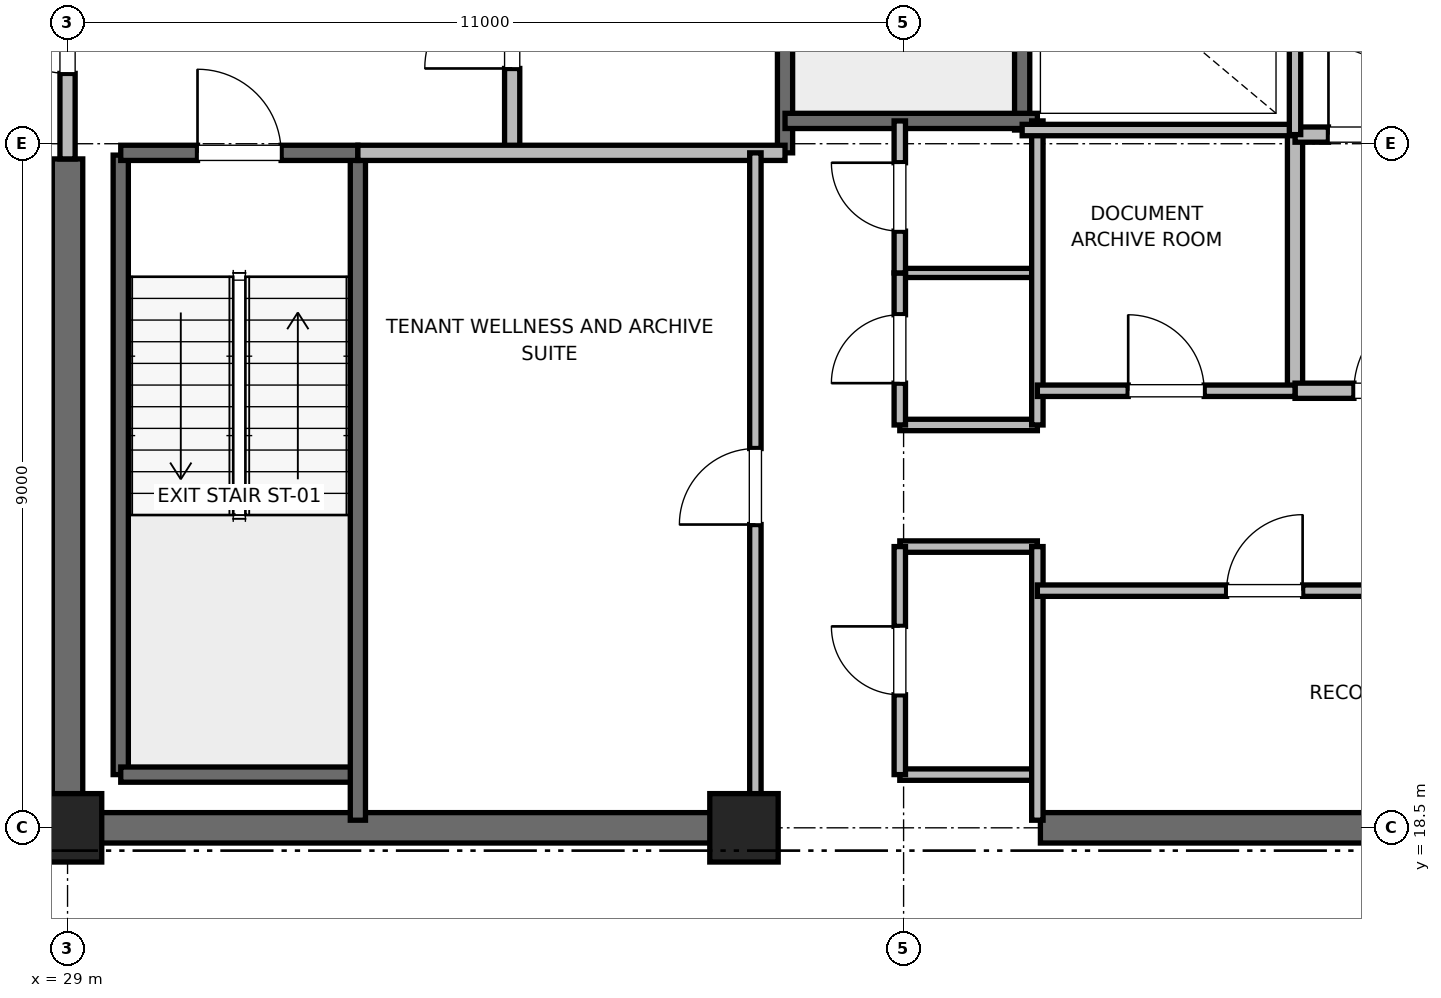
"""IFC4 building model, lengths in metres.
Left out: names, types, materials, properties, quantities, classifications, styles, units other than length and angle.
Written with IfcOpenShell. Run it as: python <this file> out.ifc"""

import sys

from ifc_helpers import new_model, si_unit, direction, frame, frame_2d, origin, origin_2d, place, context, subcontext, project, spatial, rectangle, extrude, element, fill, save


model = new_model("IFC4")
c1 = context("Model", 3, precision=1e-05, world=origin(), true_north=direction((0.0, 1.0)))
c2 = subcontext(c1, "Body", "Model", "MODEL_VIEW")
j1 = project(units=[si_unit("LENGTHUNIT", "METRE"), si_unit("PLANEANGLEUNIT", "RADIAN")], contexts=[c1])
p1 = place(None, origin())
s1 = spatial("IfcSite", under=j1, at=p1, CompositionType="ELEMENT")
p2 = place(p1, origin())
s2 = spatial("IfcBuilding", under=s1, at=p2, CompositionType="ELEMENT")
p3 = place(p2, frame((0.0, 0.0, 310.8)))
s3 = spatial("IfcBuildingStorey", under=s2, at=p3, CompositionType="ELEMENT", Elevation=310.8)
for number, where, z_axis, x_axis in (
    (1, (29.0, 18.5, 0.0), (0.0, 0.0, 1.0), (1.0, 0.0, 0.0)),
    (2, (37.9, 18.5, 0.0), (0.0, 0.0, 1.0), (1.0, 0.0, 0.0)),
):
    element("IfcColumn", number, at=place(p3, frame(where, z_axis=z_axis, x_axis=x_axis)), inside=s3, PredefinedType="PILASTER", context=c2, shape_type="SweptSolid", body=[
        extrude(rectangle(XDim=0.9, YDim=0.9, at=origin_2d()), origin(), (0.0, 0.0, 1.0), 4.0),
    ])
for number, where, z_axis, x_axis in (
    (3, (29.0, 18.5, 0.0), (0.0, 0.0, 1.0), (1.0, 0.0, 0.0)),
    (4, (41.8, 18.5, 0.0), (0.0, 0.0, 1.0), (1.0, 0.0, 0.0)),
):
    element("IfcWall", number, at=place(p3, frame(where, z_axis=z_axis, x_axis=x_axis)), inside=s3, PredefinedType="SHEAR", context=c2, shape_type="SweptSolid", body=[
        extrude(rectangle(XDim=9.2, YDim=0.4, at=frame_2d((4.6, 0.0))), origin(), (0.0, 0.0, 1.0), 3.785),
    ])
p4 = place(p3, frame((29.0, 18.5, 0.0), z_axis=(0.0, 0.0, 1.0), x_axis=(0.0, 1.0, 0.0)))
e5 = element("IfcWall", 5, at=p4, inside=s3, PredefinedType="SHEAR", context=c2, shape_type="SweptSolid", body=[
    extrude(rectangle(XDim=8.8, YDim=0.4, at=frame_2d((4.4, 0.0))), origin(), (0.0, 0.0, 1.0), 3.785),
])
p5 = place(p3, frame((29.7, 19.2, 0.0), z_axis=(0.0, 0.0, 1.0), x_axis=(0.0, 1.0, 0.0)))
e6 = element("IfcWall", 6, at=p5, inside=s3, PredefinedType="SOLIDWALL", context=c2, shape_type="SweptSolid", body=[
    extrude(rectangle(XDim=8.15, YDim=0.2, at=frame_2d((4.075, 0.0))), origin(), (0.0, 0.0, 1.0), 3.785),
])
p6 = place(p3, frame((29.7, 19.2, 0.0), z_axis=(0.0, 0.0, 1.0), x_axis=(1.0, 0.0, 0.0)))
e7 = element("IfcWall", 7, at=p6, inside=s3, PredefinedType="SOLIDWALL", context=c2, shape_type="SweptSolid", body=[
    extrude(rectangle(XDim=3.12, YDim=0.2, at=frame_2d((1.56, 0.0))), origin(), (0.0, 0.0, 1.0), 3.785),
])
p7 = place(p3, frame((32.82, 18.6, 0.0), z_axis=(0.0, 0.0, 1.0), x_axis=(0.0, 1.0, 0.0)))
e8 = element("IfcWall", 8, at=p7, inside=s3, PredefinedType="SOLIDWALL", context=c2, shape_type="SweptSolid", body=[
    extrude(rectangle(XDim=8.78, YDim=0.2, at=frame_2d((4.39, 0.0))), origin(), (0.0, 0.0, 1.0), 3.785),
])
p8 = place(p3, frame((29.7, 27.38, 0.0), z_axis=(0.0, 0.0, 1.0), x_axis=(1.0, 0.0, 0.0)))
e9 = element("IfcWall", 9, at=p8, inside=s3, PredefinedType="SOLIDWALL", context=c2, shape_type="SweptSolid", body=[
    extrude(rectangle(XDim=3.12, YDim=0.2, at=frame_2d((1.56, 0.0))), origin(), (0.0, 0.0, 1.0), 3.785),
])
p9 = place(p8, frame((1.01, 0.0, 0.0)))
e10 = element("IfcOpeningElement", 10, at=p9, cuts=e9, PredefinedType="OPENING", context=c2, shape_type="SweptSolid", body=[
    extrude(rectangle(XDim=1.1, YDim=2.15, at=frame_2d((0.55, 1.075))), frame((0.0, 0.1, 0.0), z_axis=(0.0, -1.0, 0.0), x_axis=(1.0, 0.0, 0.0)), (0.0, 0.0, 1.0), 0.2),
])
p10 = place(p3, frame((38.44, 27.38, 0.0), z_axis=(0.0, 0.0, 1.0), x_axis=(0.0, 1.0, 0.0)))
e11 = element("IfcWall", 11, at=p10, inside=s3, PredefinedType="SOLIDWALL", context=c2, shape_type="SweptSolid", body=[
    extrude(rectangle(XDim=8.87, YDim=0.2, at=frame_2d((4.435, 0.0))), origin(), (0.0, 0.0, 1.0), 3.785),
])
p11 = place(p3, frame((41.56, 27.68, 0.0), z_axis=(0.0, 0.0, 1.0), x_axis=(0.0, 1.0, 0.0)))
e12 = element("IfcWall", 12, at=p11, inside=s3, PredefinedType="SOLIDWALL", context=c2, shape_type="SweptSolid", body=[
    extrude(rectangle(XDim=8.57, YDim=0.2, at=frame_2d((4.285, 0.0))), origin(), (0.0, 0.0, 1.0), 3.785),
])
p12 = place(p3, frame((38.44, 27.8, 0.0), z_axis=(0.0, 0.0, 1.0), x_axis=(1.0, 0.0, 0.0)))
e13 = element("IfcWall", 13, at=p12, inside=s3, PredefinedType="SOLIDWALL", context=c2, shape_type="SweptSolid", body=[
    extrude(rectangle(XDim=3.32, YDim=0.2, at=frame_2d((1.66, 0.0))), origin(), (0.0, 0.0, 1.0), 3.785),
])
p13 = place(p3, frame((34.85, 27.38, 0.0), z_axis=(0.0, 0.0, 1.0), x_axis=(0.0, 1.0, 0.0)))
e14 = element("IfcWall", 14, at=p13, inside=s3, PredefinedType="PARTITIONING", context=c2, shape_type="SweptSolid", body=[
    extrude(rectangle(XDim=3.37, YDim=0.2, at=frame_2d((1.685, 0.0))), origin(), (0.0, 0.0, 1.0), 3.785),
])
p14 = place(p13, frame((1.11, 0.0, 0.0)))
e15 = element("IfcOpeningElement", 15, at=p14, cuts=e14, PredefinedType="OPENING", context=c2, shape_type="SweptSolid", body=[
    extrude(rectangle(XDim=1.15, YDim=2.2, at=frame_2d((0.575, 1.1))), frame((0.0, 0.1, 0.0), z_axis=(0.0, -1.0, 0.0), x_axis=(1.0, 0.0, 0.0)), (0.0, 0.0, 1.0), 0.2),
])
p15 = place(p3, frame((29.0, 27.3, 0.0), z_axis=(0.0, 0.0, 1.0), x_axis=(0.0, 1.0, 0.0)))
e16 = element("IfcWall", 16, at=p15, inside=s3, PredefinedType="PARTITIONING", context=c2, shape_type="SweptSolid", body=[
    extrude(rectangle(XDim=3.4, YDim=0.2, at=frame_2d((1.7, 0.0))), origin(), (0.0, 0.0, 1.0), 2.865),
])
p16 = place(p15, frame((1.125, 0.0, 0.0)))
e17 = element("IfcOpeningElement", 17, at=p16, cuts=e16, PredefinedType="OPENING", context=c2, shape_type="SweptSolid", body=[
    extrude(rectangle(XDim=1.15, YDim=2.2, at=frame_2d((0.575, 1.1))), frame((0.0, 0.1, 0.0), z_axis=(0.0, -1.0, 0.0), x_axis=(1.0, 0.0, 0.0)), (0.0, 0.0, 1.0), 0.2),
])
p17 = place(p3, frame((32.82, 27.38, 0.0), z_axis=(0.0, 0.0, 1.0), x_axis=(1.0, 0.0, 0.0)))
e18 = element("IfcWall", 18, at=p17, inside=s3, PredefinedType="PARTITIONING", context=c2, shape_type="SweptSolid", body=[
    extrude(rectangle(XDim=5.62, YDim=0.2, at=frame_2d((2.81, 0.0))), origin(), (0.0, 0.0, 1.0), 3.785),
])
p18 = place(p3, frame((45.15, 24.25, 0.0), z_axis=(0.0, 0.0, 1.0), x_axis=(0.0, 1.0, 0.0)))
e19 = element("IfcWall", 19, at=p18, inside=s3, PredefinedType="PARTITIONING", context=c2, shape_type="SweptSolid", body=[
    extrude(rectangle(XDim=3.37, YDim=0.2, at=frame_2d((1.685, 0.0))), origin(), (0.0, 0.0, 1.0), 3.785),
])
p19 = place(p3, frame((45.15, 24.25, 0.0), z_axis=(0.0, 0.0, 1.0), x_axis=(1.0, 0.0, 0.0)))
e20 = element("IfcWall", 20, at=p19, inside=s3, PredefinedType="PARTITIONING", context=c2, shape_type="SweptSolid", body=[
    extrude(rectangle(XDim=2.7, YDim=0.2, at=frame_2d((1.35, 0.0))), origin(), (0.0, 0.0, 1.0), 3.785),
])
p20 = place(p19, frame((0.775, 0.0, 0.0)))
e21 = element("IfcOpeningElement", 21, at=p20, cuts=e20, PredefinedType="OPENING", context=c2, shape_type="SweptSolid", body=[
    extrude(rectangle(XDim=1.15, YDim=2.2, at=frame_2d((0.575, 1.1))), frame((0.0, 0.1, 0.0), z_axis=(0.0, -1.0, 0.0), x_axis=(1.0, 0.0, 0.0)), (0.0, 0.0, 1.0), 0.2),
])
p21 = place(p3, frame((45.15, 27.62, 0.0), z_axis=(0.0, 0.0, 1.0), x_axis=(1.0, 0.0, 0.0)))
e22 = element("IfcWall", 22, at=p21, inside=s3, PredefinedType="PARTITIONING", context=c2, shape_type="SweptSolid", body=[
    extrude(rectangle(XDim=2.03, YDim=0.2, at=frame_2d((1.015, 0.0))), origin(), (0.0, 0.0, 1.0), 3.785),
])
p22 = place(p21, frame((0.44, 0.0, 0.0)))
e23 = element("IfcOpeningElement", 23, at=p22, cuts=e22, PredefinedType="OPENING", context=c2, shape_type="SweptSolid", body=[
    extrude(rectangle(XDim=1.15, YDim=2.2, at=frame_2d((0.575, 1.1))), frame((0.0, 0.1, 0.0), z_axis=(0.0, -1.0, 0.0), x_axis=(1.0, 0.0, 0.0)), (0.0, 0.0, 1.0), 0.2),
])
for number, where, z_axis, x_axis in (
    (24, (39.95, 19.2, 0.0), (0.0, 0.0, 1.0), (1.0, 0.0, 0.0)),
    (25, (39.95, 22.2, 0.0), (0.0, 0.0, 1.0), (1.0, 0.0, 0.0)),
    (26, (39.95, 23.8, 0.0), (0.0, 0.0, 1.0), (1.0, 0.0, 0.0)),
):
    element("IfcWall", number, at=place(p3, frame(where, z_axis=z_axis, x_axis=x_axis)), inside=s3, PredefinedType="PARTITIONING", context=c2, shape_type="SweptSolid", body=[
        extrude(rectangle(XDim=1.81, YDim=0.15, at=frame_2d((0.905, 0.0))), origin(), (0.0, 0.0, 1.0), 2.85),
    ])
p23 = place(p3, frame((39.95, 25.8, 0.0), z_axis=(0.0, 0.0, 1.0), x_axis=(1.0, 0.0, 0.0)))
e27 = element("IfcWall", 27, at=p23, inside=s3, PredefinedType="PARTITIONING", context=c2, shape_type="SweptSolid", body=[
    extrude(rectangle(XDim=1.81, YDim=0.12, at=frame_2d((0.905, 0.0))), origin(), (0.0, 0.0, 1.0), 2.85),
])
p24 = place(p3, frame((41.76, 18.6, 0.0), z_axis=(0.0, 0.0, 1.0), x_axis=(0.0, 1.0, 0.0)))
e28 = element("IfcWall", 28, at=p24, inside=s3, PredefinedType="PARTITIONING", context=c2, shape_type="SweptSolid", body=[
    extrude(rectangle(XDim=3.6, YDim=0.15, at=frame_2d((1.8, 0.0))), origin(), (0.0, 0.0, 1.0), 2.85),
])
p25 = place(p3, frame((41.76, 23.8, 0.0), z_axis=(0.0, 0.0, 1.0), x_axis=(0.0, 1.0, 0.0)))
e29 = element("IfcWall", 29, at=p25, inside=s3, PredefinedType="PARTITIONING", context=c2, shape_type="SweptSolid", body=[
    extrude(rectangle(XDim=4.0, YDim=0.15, at=frame_2d((2.0, 0.0))), origin(), (0.0, 0.0, 1.0), 2.85),
])
p26 = place(p3, frame((39.95, 19.2, 0.0), z_axis=(0.0, 0.0, 1.0), x_axis=(0.0, 1.0, 0.0)))
e30 = element("IfcWall", 30, at=p26, inside=s3, PredefinedType="PARTITIONING", context=c2, shape_type="SweptSolid", body=[
    extrude(rectangle(XDim=3.0, YDim=0.15, at=frame_2d((1.5, 0.0))), origin(), (0.0, 0.0, 1.0), 2.85),
])
p27 = place(p26, frame((1.05, 0.0, 0.0)))
e31 = element("IfcOpeningElement", 31, at=p27, cuts=e30, PredefinedType="OPENING", context=c2, shape_type="SweptSolid", body=[
    extrude(rectangle(XDim=0.9, YDim=2.1, at=frame_2d((0.45, 1.05))), frame((0.0, 0.075, 0.0), z_axis=(0.0, -1.0, 0.0), x_axis=(1.0, 0.0, 0.0)), (0.0, 0.0, 1.0), 0.15),
])
p28 = place(p3, frame((39.95, 23.8, 0.0), z_axis=(0.0, 0.0, 1.0), x_axis=(0.0, 1.0, 0.0)))
e32 = element("IfcWall", 32, at=p28, inside=s3, PredefinedType="PARTITIONING", context=c2, shape_type="SweptSolid", body=[
    extrude(rectangle(XDim=2.0, YDim=0.15, at=frame_2d((1.0, 0.0))), origin(), (0.0, 0.0, 1.0), 2.85),
])
p29 = place(p28, frame((0.55, 0.0, 0.0)))
e33 = element("IfcOpeningElement", 33, at=p29, cuts=e32, PredefinedType="OPENING", context=c2, shape_type="SweptSolid", body=[
    extrude(rectangle(XDim=0.9, YDim=2.1, at=frame_2d((0.45, 1.05))), frame((0.0, 0.075, 0.0), z_axis=(0.0, -1.0, 0.0), x_axis=(1.0, 0.0, 0.0)), (0.0, 0.0, 1.0), 0.15),
])
p30 = place(p3, frame((39.95, 25.8, 0.0), z_axis=(0.0, 0.0, 1.0), x_axis=(0.0, 1.0, 0.0)))
e34 = element("IfcWall", 34, at=p30, inside=s3, PredefinedType="PARTITIONING", context=c2, shape_type="SweptSolid", body=[
    extrude(rectangle(XDim=2.0, YDim=0.15, at=frame_2d((1.0, 0.0))), origin(), (0.0, 0.0, 1.0), 2.85),
])
p31 = place(p30, frame((0.55, 0.0, 0.0)))
e35 = element("IfcOpeningElement", 35, at=p31, cuts=e34, PredefinedType="OPENING", context=c2, shape_type="SweptSolid", body=[
    extrude(rectangle(XDim=0.9, YDim=2.1, at=frame_2d((0.45, 1.05))), frame((0.0, 0.075, 0.0), z_axis=(0.0, -1.0, 0.0), x_axis=(1.0, 0.0, 0.0)), (0.0, 0.0, 1.0), 0.15),
])
p32 = place(p3, frame((38.05, 18.6, 0.0), z_axis=(0.0, 0.0, 1.0), x_axis=(0.0, 1.0, 0.0)))
e36 = element("IfcWall", 36, at=p32, inside=s3, PredefinedType="PARTITIONING", context=c2, shape_type="SweptSolid", body=[
    extrude(rectangle(XDim=8.78, YDim=0.15, at=frame_2d((4.39, 0.0))), origin(), (0.0, 0.0, 1.0), 2.85),
])
p33 = place(p32, frame((3.89, 0.0, 0.0)))
e37 = element("IfcOpeningElement", 37, at=p33, cuts=e36, PredefinedType="OPENING", context=c2, shape_type="SweptSolid", body=[
    extrude(rectangle(XDim=1.0, YDim=2.15, at=frame_2d((0.5, 1.075))), frame((0.0, 0.075, 0.0), z_axis=(0.0, -1.0, 0.0), x_axis=(1.0, 0.0, 0.0)), (0.0, 0.0, 1.0), 0.15),
])
p34 = place(p3, frame((41.56, 27.68, 0.0), z_axis=(0.0, 0.0, 1.0), x_axis=(1.0, 0.0, 0.0)))
e38 = element("IfcWall", 38, at=p34, inside=s3, PredefinedType="PARTITIONING", context=c2, shape_type="SweptSolid", body=[
    extrude(rectangle(XDim=3.59, YDim=0.15, at=frame_2d((1.795, 0.0))), origin(), (0.0, 0.0, 1.0), 2.85),
])
p35 = place(p3, frame((41.76, 21.62, 0.0), z_axis=(0.0, 0.0, 1.0), x_axis=(1.0, 0.0, 0.0)))
e39 = element("IfcWall", 39, at=p35, inside=s3, PredefinedType="PARTITIONING", context=c2, shape_type="SweptSolid", body=[
    extrude(rectangle(XDim=5.98, YDim=0.15, at=frame_2d((2.99, 0.0))), origin(), (0.0, 0.0, 1.0), 2.85),
])
p36 = place(p35, frame((2.49, 0.0, 0.0)))
e40 = element("IfcOpeningElement", 40, at=p36, cuts=e39, PredefinedType="OPENING", context=c2, shape_type="SweptSolid", body=[
    extrude(rectangle(XDim=1.0, YDim=2.15, at=frame_2d((0.5, 1.075))), frame((0.0, 0.075, 0.0), z_axis=(0.0, -1.0, 0.0), x_axis=(1.0, 0.0, 0.0)), (0.0, 0.0, 1.0), 0.15),
])
p37 = place(p3, frame((41.76, 24.25, 0.0), z_axis=(0.0, 0.0, 1.0), x_axis=(1.0, 0.0, 0.0)))
e41 = element("IfcWall", 41, at=p37, inside=s3, PredefinedType="PARTITIONING", context=c2, shape_type="SweptSolid", body=[
    extrude(rectangle(XDim=3.39, YDim=0.15, at=frame_2d((1.695, 0.0))), origin(), (0.0, 0.0, 1.0), 2.85),
])
p38 = place(p37, frame((1.195, 0.0, 0.0)))
e42 = element("IfcOpeningElement", 42, at=p38, cuts=e41, PredefinedType="OPENING", context=c2, shape_type="SweptSolid", body=[
    extrude(rectangle(XDim=1.0, YDim=2.15, at=frame_2d((0.5, 1.075))), frame((0.0, 0.075, 0.0), z_axis=(0.0, -1.0, 0.0), x_axis=(1.0, 0.0, 0.0)), (0.0, 0.0, 1.0), 0.15),
])
p39 = place(p3, frame((45.15, 27.62, 0.0), z_axis=(0.0, 0.0, 1.0), x_axis=(0.0, 1.0, 0.0)))
e43 = element("IfcWall", 43, at=p39, inside=s3, PredefinedType="PARTITIONING", context=c2, shape_type="SweptSolid", body=[
    extrude(rectangle(XDim=3.1, YDim=0.15, at=frame_2d((1.55, 0.0))), origin(), (0.0, 0.0, 1.0), 2.85),
])
p40 = place(p9, origin())
e44 = element("IfcDoor", 44, at=p40, inside=s3, OperationType="SINGLE_SWING_LEFT", PredefinedType="DOOR", context=c2, shape_type="SweptSolid", body=[
    extrude(rectangle(XDim=1.1, YDim=2.15, at=frame_2d((0.55, 1.075))), frame((0.0, 0.025, 0.0), z_axis=(0.0, -1.0, 0.0), x_axis=(1.0, 0.0, 0.0)), (0.0, 0.0, 1.0), 0.05),
])
fill(e10, e44)
p41 = place(p14, origin())
e45 = element("IfcDoor", 45, at=p41, inside=s3, OperationType="SINGLE_SWING_LEFT", PredefinedType="DOOR", context=c2, shape_type="SweptSolid", body=[
    extrude(rectangle(XDim=1.15, YDim=2.2, at=frame_2d((0.575, 1.1))), frame((0.0, 0.025, 0.0), z_axis=(0.0, -1.0, 0.0), x_axis=(1.0, 0.0, 0.0)), (0.0, 0.0, 1.0), 0.05),
])
fill(e15, e45)
p42 = place(p16, origin())
e46 = element("IfcDoor", 46, at=p42, inside=s3, OperationType="SINGLE_SWING_RIGHT", PredefinedType="DOOR", context=c2, shape_type="SweptSolid", body=[
    extrude(rectangle(XDim=1.15, YDim=2.2, at=frame_2d((0.575, 1.1))), frame((0.0, 0.025, 0.0), z_axis=(0.0, -1.0, 0.0), x_axis=(1.0, 0.0, 0.0)), (0.0, 0.0, 1.0), 0.05),
])
fill(e17, e46)
p43 = place(p20, origin())
e47 = element("IfcDoor", 47, at=p43, inside=s3, OperationType="SINGLE_SWING_RIGHT", PredefinedType="DOOR", context=c2, shape_type="SweptSolid", body=[
    extrude(rectangle(XDim=1.15, YDim=2.2, at=frame_2d((0.575, 1.1))), frame((0.0, 0.025, 0.0), z_axis=(0.0, -1.0, 0.0), x_axis=(1.0, 0.0, 0.0)), (0.0, 0.0, 1.0), 0.05),
])
fill(e21, e47)
p44 = place(p22, origin())
e48 = element("IfcDoor", 48, at=p44, inside=s3, OperationType="SINGLE_SWING_LEFT", PredefinedType="DOOR", context=c2, shape_type="SweptSolid", body=[
    extrude(rectangle(XDim=1.15, YDim=2.2, at=frame_2d((0.575, 1.1))), frame((0.0, 0.025, 0.0), z_axis=(0.0, -1.0, 0.0), x_axis=(1.0, 0.0, 0.0)), (0.0, 0.0, 1.0), 0.05),
])
fill(e23, e48)
p45 = place(p27, origin())
e49 = element("IfcDoor", 49, at=p45, inside=s3, OperationType="SINGLE_SWING_RIGHT", PredefinedType="DOOR", context=c2, shape_type="SweptSolid", body=[
    extrude(rectangle(XDim=0.9, YDim=2.1, at=frame_2d((0.45, 1.05))), frame((0.0, 0.025, 0.0), z_axis=(0.0, -1.0, 0.0), x_axis=(1.0, 0.0, 0.0)), (0.0, 0.0, 1.0), 0.05),
])
fill(e31, e49)
p46 = place(p29, origin())
e50 = element("IfcDoor", 50, at=p46, inside=s3, OperationType="SINGLE_SWING_LEFT", PredefinedType="DOOR", context=c2, shape_type="SweptSolid", body=[
    extrude(rectangle(XDim=0.9, YDim=2.1, at=frame_2d((0.45, 1.05))), frame((0.0, 0.025, 0.0), z_axis=(0.0, -1.0, 0.0), x_axis=(1.0, 0.0, 0.0)), (0.0, 0.0, 1.0), 0.05),
])
fill(e33, e50)
p47 = place(p31, origin())
e51 = element("IfcDoor", 51, at=p47, inside=s3, OperationType="SINGLE_SWING_RIGHT", PredefinedType="DOOR", context=c2, shape_type="SweptSolid", body=[
    extrude(rectangle(XDim=0.9, YDim=2.1, at=frame_2d((0.45, 1.05))), frame((0.0, 0.025, 0.0), z_axis=(0.0, -1.0, 0.0), x_axis=(1.0, 0.0, 0.0)), (0.0, 0.0, 1.0), 0.05),
])
fill(e35, e51)
p48 = place(p33, origin())
e52 = element("IfcDoor", 52, at=p48, inside=s3, OperationType="SINGLE_SWING_LEFT", PredefinedType="DOOR", context=c2, shape_type="SweptSolid", body=[
    extrude(rectangle(XDim=1.0, YDim=2.15, at=frame_2d((0.5, 1.075))), frame((0.0, 0.025, 0.0), z_axis=(0.0, -1.0, 0.0), x_axis=(1.0, 0.0, 0.0)), (0.0, 0.0, 1.0), 0.05),
])
fill(e37, e52)
p49 = place(p36, origin())
e53 = element("IfcDoor", 53, at=p49, inside=s3, OperationType="SINGLE_SWING_RIGHT", PredefinedType="DOOR", context=c2, shape_type="SweptSolid", body=[
    extrude(rectangle(XDim=1.0, YDim=2.15, at=frame_2d((0.5, 1.075))), frame((0.0, 0.025, 0.0), z_axis=(0.0, -1.0, 0.0), x_axis=(1.0, 0.0, 0.0)), (0.0, 0.0, 1.0), 0.05),
])
fill(e40, e53)
p50 = place(p38, origin())
e54 = element("IfcDoor", 54, at=p50, inside=s3, OperationType="SINGLE_SWING_LEFT", PredefinedType="DOOR", context=c2, shape_type="SweptSolid", body=[
    extrude(rectangle(XDim=1.0, YDim=2.15, at=frame_2d((0.5, 1.075))), frame((0.0, 0.025, 0.0), z_axis=(0.0, -1.0, 0.0), x_axis=(1.0, 0.0, 0.0)), (0.0, 0.0, 1.0), 0.05),
])
fill(e42, e54)
save(model, sys.argv[1])
